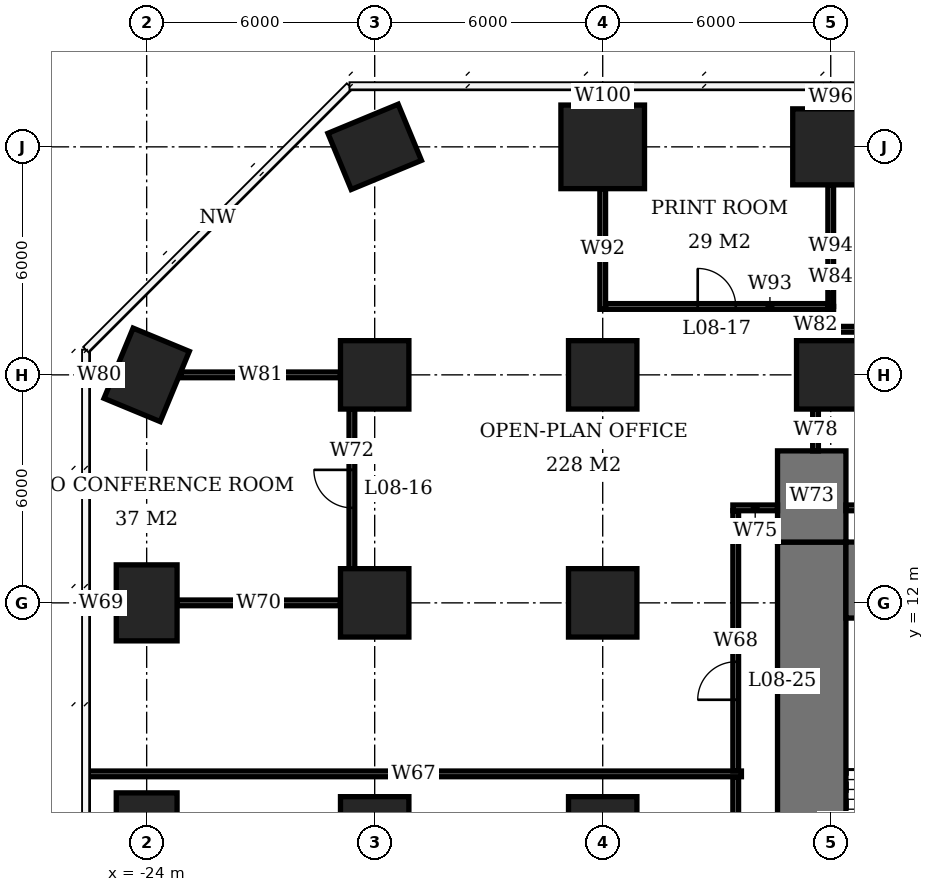
"""IFC4 building model, lengths in metres.
Left out: names, types, materials, properties, quantities, classifications, styles, units other than length and angle.
Written with IfcOpenShell. Run it as: python <this file> out.ifc"""

import sys

from ifc_helpers import new_model, si_unit, direction, frame, frame_2d, origin, origin_2d, place, context, subcontext, project, spatial, rectangle, extrude, element, fill, save


model = new_model("IFC4")
c1 = context("Model", 3, precision=1e-05, world=origin(), true_north=direction((0.0, 1.0)))
c2 = subcontext(c1, "Body", "Model", "MODEL_VIEW")
j1 = project(units=[si_unit("LENGTHUNIT", "METRE"), si_unit("PLANEANGLEUNIT", "RADIAN")], contexts=[c1])
p1 = place(None, origin())
s1 = spatial("IfcSite", under=j1, at=p1, CompositionType="ELEMENT")
p2 = place(p1, origin())
s2 = spatial("IfcBuilding", under=s1, at=p2, CompositionType="ELEMENT")
p3 = place(p2, frame((0.0, 0.0, 37.7)))
s3 = spatial("IfcBuildingStorey", under=s2, at=p3, CompositionType="ELEMENT", Elevation=37.7)
for number, where, z_axis, x_axis in (
    (1, (-24.0, 6.0, 0.0), (0.0, 0.0, 1.0), (0.0, 1.0, 0.0)),
    (2, (-24.0, 12.0, 0.0), (0.0, 0.0, 1.0), (0.0, 1.0, 0.0)),
    (3, (-24.0, 18.0, 0.0), (0.0, 0.0, 1.0), (0.383, 0.924, 0.0)),
):
    element("IfcColumn", number, at=place(p3, frame(where, z_axis=z_axis, x_axis=x_axis)), inside=s3, PredefinedType="COLUMN", context=c2, shape_type="SweptSolid", body=[
        extrude(rectangle(XDim=2.0, YDim=1.6, at=origin_2d()), origin(), (0.0, 0.0, 1.0), 3.9),
    ])
for number, where, z_axis, x_axis in (
    (4, (-18.0, 6.0, 0.0), (0.0, 0.0, 1.0), (1.0, 0.0, 0.0)),
    (5, (-18.0, 12.0, 0.0), (0.0, 0.0, 1.0), (1.0, 0.0, 0.0)),
    (6, (-18.0, 18.0, 0.0), (0.0, 0.0, 1.0), (1.0, 0.0, 0.0)),
):
    element("IfcColumn", number, at=place(p3, frame(where, z_axis=z_axis, x_axis=x_axis)), inside=s3, PredefinedType="COLUMN", context=c2, shape_type="SweptSolid", body=[
        extrude(rectangle(XDim=1.8, YDim=1.8, at=origin_2d()), origin(), (0.0, 0.0, 1.0), 3.9),
    ])
p4 = place(p3, frame((-18.0, 24.0, 0.0), z_axis=(0.0, 0.0, 1.0), x_axis=(0.923879532511, 0.382683432365, 0.0)))
e7 = element("IfcColumn", 7, at=p4, inside=s3, PredefinedType="COLUMN", context=c2, shape_type="SweptSolid", body=[
    extrude(rectangle(XDim=2.0, YDim=1.6, at=origin_2d()), origin(), (0.0, 0.0, 1.0), 3.9),
])
for number, where, z_axis, x_axis in (
    (8, (-12.0, 6.0, 0.0), (0.0, 0.0, 1.0), (1.0, 0.0, 0.0)),
    (9, (-12.0, 12.0, 0.0), (0.0, 0.0, 1.0), (1.0, 0.0, 0.0)),
    (10, (-12.0, 18.0, 0.0), (0.0, 0.0, 1.0), (1.0, 0.0, 0.0)),
):
    element("IfcColumn", number, at=place(p3, frame(where, z_axis=z_axis, x_axis=x_axis)), inside=s3, PredefinedType="COLUMN", context=c2, shape_type="SweptSolid", body=[
        extrude(rectangle(XDim=1.8, YDim=1.8, at=origin_2d()), origin(), (0.0, 0.0, 1.0), 3.9),
    ])
p5 = place(p3, frame((-12.0, 24.0, 0.0), z_axis=(0.0, 0.0, 1.0), x_axis=(1.0, 0.0, 0.0)))
e11 = element("IfcColumn", 11, at=p5, inside=s3, PredefinedType="COLUMN", context=c2, shape_type="SweptSolid", body=[
    extrude(rectangle(XDim=2.2, YDim=2.2, at=origin_2d()), origin(), (0.0, 0.0, 1.0), 3.9),
])
p6 = place(p3, frame((-6.0, 18.0, 0.0), z_axis=(0.0, 0.0, 1.0), x_axis=(1.0, 0.0, 0.0)))
e12 = element("IfcColumn", 12, at=p6, inside=s3, PredefinedType="COLUMN", context=c2, shape_type="SweptSolid", body=[
    extrude(rectangle(XDim=1.8, YDim=1.8, at=origin_2d()), origin(), (0.0, 0.0, 1.0), 3.9),
])
p7 = place(p3, frame((-6.0, 24.0, 0.0), z_axis=(0.0, 0.0, 1.0), x_axis=(1.0, 0.0, 0.0)))
e13 = element("IfcColumn", 13, at=p7, inside=s3, PredefinedType="COLUMN", context=c2, shape_type="SweptSolid", body=[
    extrude(rectangle(XDim=2.0, YDim=2.0, at=origin_2d()), origin(), (0.0, 0.0, 1.0), 3.9),
])
p8 = place(p3, frame((-5.6, 12.6, 0.0), z_axis=(0.0, 0.0, 1.0), x_axis=(1.0, 0.0, 0.0)))
e14 = element("IfcWall", 14, at=p8, inside=s3, PredefinedType="SHEAR", context=c2, shape_type="SweptSolid", body=[
    extrude(rectangle(XDim=23.2, YDim=2.0, at=frame_2d((11.6, 0.0))), origin(), (0.0, 0.0, 1.0), 3.9),
])
p9 = place(p3, frame((-6.5, -7.6, 0.0), z_axis=(0.0, 0.0, 1.0), x_axis=(0.0, 1.0, 0.0)))
e15 = element("IfcWall", 15, at=p9, inside=s3, PredefinedType="SHEAR", context=c2, shape_type="SweptSolid", body=[
    extrude(rectangle(XDim=21.2, YDim=1.8, at=frame_2d((10.6, 0.0))), origin(), (0.0, 0.0, 1.0), 3.9),
])
p10 = place(p9, frame((7.8, 0.0, 0.0)))
e16 = element("IfcOpeningElement", 16, at=p10, cuts=e15, PredefinedType="OPENING", context=c2, shape_type="SweptSolid", body=[
    extrude(rectangle(XDim=1.8, YDim=2.4, at=frame_2d((0.9, 1.2))), frame((0.0, 0.91, 0.0), z_axis=(0.0, -1.0, 0.0), x_axis=(1.0, 0.0, 0.0)), (0.0, 0.0, 1.0), 1.82),
])
p11 = place(p3, frame((-6.5, 13.6, 0.0), z_axis=(0.0, 0.0, 1.0), x_axis=(0.0, 1.0, 0.0)))
e17 = element("IfcWall", 17, at=p11, inside=s3, PredefinedType="SHEAR", context=c2, shape_type="SweptSolid", body=[
    extrude(rectangle(XDim=2.4, YDim=1.8, at=frame_2d((1.2, 0.0))), origin(), (0.0, 0.0, 1.0), 3.9),
])
p12 = place(p3, frame((-25.6, 12.0, 0.0), z_axis=(0.0, 0.0, 1.0), x_axis=(1.0, 0.0, 0.0)))
e18 = element("IfcWall", 18, at=p12, inside=s3, PredefinedType="PARTITIONING", context=c2, shape_type="SweptSolid", body=[
    extrude(rectangle(XDim=0.8, YDim=0.15, at=frame_2d((0.4, 0.0))), origin(), (0.0, 0.0, 1.0), 3.65),
])
p13 = place(p3, frame((-23.2, 12.0, 0.0), z_axis=(0.0, 0.0, 1.0), x_axis=(1.0, 0.0, 0.0)))
e19 = element("IfcWall", 19, at=p13, inside=s3, PredefinedType="PARTITIONING", context=c2, shape_type="SweptSolid", body=[
    extrude(rectangle(XDim=4.3, YDim=0.15, at=frame_2d((2.15, 0.0))), origin(), (0.0, 0.0, 1.0), 3.65),
])
p14 = place(p3, frame((-25.6, 18.0, 0.0), z_axis=(0.0, 0.0, 1.0), x_axis=(1.0, 0.0, 0.0)))
e20 = element("IfcWall", 20, at=p14, inside=s3, PredefinedType="PARTITIONING", context=c2, shape_type="SweptSolid", body=[
    extrude(rectangle(XDim=0.703, YDim=0.15, at=frame_2d((0.352, 0.0))), origin(), (0.0, 0.0, 1.0), 3.65),
])
p15 = place(p3, frame((-23.103, 18.0, 0.0), z_axis=(0.0, 0.0, 1.0), x_axis=(1.0, 0.0, 0.0)))
e21 = element("IfcWall", 21, at=p15, inside=s3, PredefinedType="PARTITIONING", context=c2, shape_type="SweptSolid", body=[
    extrude(rectangle(XDim=4.203, YDim=0.15, at=frame_2d((2.102, 0.0))), origin(), (0.0, 0.0, 1.0), 3.65),
])
p16 = place(p3, frame((-5.925, 19.2, 0.0), z_axis=(0.0, 0.0, 1.0), x_axis=(1.0, 0.0, 0.0)))
e22 = element("IfcWall", 22, at=p16, inside=s3, PredefinedType="PARTITIONING", context=c2, shape_type="SweptSolid", body=[
    extrude(rectangle(XDim=5.85, YDim=0.15, at=frame_2d((2.925, 0.0))), origin(), (0.0, 0.0, 1.0), 3.65),
])
p17 = place(p16, frame((2.425, 0.0, 0.0)))
e23 = element("IfcOpeningElement", 23, at=p17, cuts=e22, PredefinedType="OPENING", context=c2, shape_type="SweptSolid", body=[
    extrude(rectangle(XDim=1.0, YDim=2.1, at=frame_2d((0.5, 1.05))), frame((0.0, 0.085, 0.0), z_axis=(0.0, -1.0, 0.0), x_axis=(1.0, 0.0, 0.0)), (0.0, 0.0, 1.0), 0.17),
])
p18 = place(p3, frame((-11.925, 19.8, 0.0), z_axis=(0.0, 0.0, 1.0), x_axis=(1.0, 0.0, 0.0)))
e24 = element("IfcWall", 24, at=p18, inside=s3, PredefinedType="PARTITIONING", context=c2, shape_type="SweptSolid", body=[
    extrude(rectangle(XDim=5.85, YDim=0.15, at=frame_2d((2.925, 0.0))), origin(), (0.0, 0.0, 1.0), 3.65),
])
p19 = place(p18, frame((2.425, 0.0, 0.0)))
e25 = element("IfcOpeningElement", 25, at=p19, cuts=e24, PredefinedType="OPENING", context=c2, shape_type="SweptSolid", body=[
    extrude(rectangle(XDim=1.0, YDim=2.1, at=frame_2d((0.5, 1.05))), frame((0.0, 0.085, 0.0), z_axis=(0.0, -1.0, 0.0), x_axis=(1.0, 0.0, 0.0)), (0.0, 0.0, 1.0), 0.17),
])
p20 = place(p3, frame((-18.6, 12.9, 0.0), z_axis=(0.0, 0.0, 1.0), x_axis=(0.0, 1.0, 0.0)))
e26 = element("IfcWall", 26, at=p20, inside=s3, PredefinedType="PARTITIONING", context=c2, shape_type="SweptSolid", body=[
    extrude(rectangle(XDim=4.2, YDim=0.15, at=frame_2d((2.1, 0.0))), origin(), (0.0, 0.0, 1.0), 3.65),
])
p21 = place(p20, frame((1.6, 0.0, 0.0)))
e27 = element("IfcOpeningElement", 27, at=p21, cuts=e26, PredefinedType="OPENING", context=c2, shape_type="SweptSolid", body=[
    extrude(rectangle(XDim=1.0, YDim=2.1, at=frame_2d((0.5, 1.05))), frame((0.0, 0.085, 0.0), z_axis=(0.0, -1.0, 0.0), x_axis=(1.0, 0.0, 0.0)), (0.0, 0.0, 1.0), 0.17),
])
p22 = place(p3, frame((-12.0, 19.725, 0.0), z_axis=(0.0, 0.0, 1.0), x_axis=(0.0, 1.0, 0.0)))
e28 = element("IfcWall", 28, at=p22, inside=s3, PredefinedType="PARTITIONING", context=c2, shape_type="SweptSolid", body=[
    extrude(rectangle(XDim=3.175, YDim=0.15, at=frame_2d((1.587, 0.0))), origin(), (0.0, 0.0, 1.0), 3.65),
])
p23 = place(p3, frame((-12.0, 25.1, 0.0), z_axis=(0.0, 0.0, 1.0), x_axis=(0.0, 1.0, 0.0)))
e29 = element("IfcWall", 29, at=p23, inside=s3, PredefinedType="PARTITIONING", context=c2, shape_type="SweptSolid", body=[
    extrude(rectangle(XDim=0.5, YDim=0.15, at=frame_2d((0.25, 0.0))), origin(), (0.0, 0.0, 1.0), 3.65),
])
p24 = place(p3, frame((-6.0, 19.125, 0.0), z_axis=(0.0, 0.0, 1.0), x_axis=(0.0, 1.0, 0.0)))
e30 = element("IfcWall", 30, at=p24, inside=s3, PredefinedType="PARTITIONING", context=c2, shape_type="SweptSolid", body=[
    extrude(rectangle(XDim=0.675, YDim=0.15, at=frame_2d((0.337, 0.0))), origin(), (0.0, 0.0, 1.0), 3.65),
])
p25 = place(p3, frame((-6.0, 19.8, 0.0), z_axis=(0.0, 0.0, 1.0), x_axis=(0.0, 1.0, 0.0)))
e31 = element("IfcWall", 31, at=p25, inside=s3, PredefinedType="PARTITIONING", context=c2, shape_type="SweptSolid", body=[
    extrude(rectangle(XDim=3.2, YDim=0.15, at=frame_2d((1.6, 0.0))), origin(), (0.0, 0.0, 1.0), 3.65),
])
p26 = place(p3, frame((-6.0, 25.0, 0.0), z_axis=(0.0, 0.0, 1.0), x_axis=(0.0, 1.0, 0.0)))
e32 = element("IfcWall", 32, at=p26, inside=s3, PredefinedType="PARTITIONING", context=c2, shape_type="SweptSolid", body=[
    extrude(rectangle(XDim=0.6, YDim=0.15, at=frame_2d((0.3, 0.0))), origin(), (0.0, 0.0, 1.0), 3.65),
])
p27 = place(p3, frame((-25.6, 7.5, 0.0), z_axis=(0.0, 0.0, 1.0), x_axis=(1.0, 0.0, 0.0)))
e33 = element("IfcWall", 33, at=p27, inside=s3, PredefinedType="PARTITIONING", context=c2, shape_type="SweptSolid", body=[
    extrude(rectangle(XDim=17.25, YDim=0.15, at=frame_2d((8.625, 0.0))), origin(), (0.0, 0.0, 1.0), 3.65),
])
p28 = place(p3, frame((-8.5, -1.425, 0.0), z_axis=(0.0, 0.0, 1.0), x_axis=(0.0, 1.0, 0.0)))
e34 = element("IfcWall", 34, at=p28, inside=s3, PredefinedType="PARTITIONING", context=c2, shape_type="SweptSolid", body=[
    extrude(rectangle(XDim=8.85, YDim=0.15, at=frame_2d((4.425, 0.0))), origin(), (0.0, 0.0, 1.0), 3.65),
])
p29 = place(p28, frame((2.575, 0.0, 0.0)))
e35 = element("IfcOpeningElement", 35, at=p29, cuts=e34, PredefinedType="OPENING", context=c2, shape_type="SweptSolid", body=[
    extrude(rectangle(XDim=1.0, YDim=2.1, at=frame_2d((0.5, 1.05))), frame((0.0, 0.085, 0.0), z_axis=(0.0, -1.0, 0.0), x_axis=(1.0, 0.0, 0.0)), (0.0, 0.0, 1.0), 0.17),
])
p30 = place(p3, frame((-8.5, 7.575, 0.0), z_axis=(0.0, 0.0, 1.0), x_axis=(0.0, 1.0, 0.0)))
e36 = element("IfcWall", 36, at=p30, inside=s3, PredefinedType="PARTITIONING", context=c2, shape_type="SweptSolid", body=[
    extrude(rectangle(XDim=6.85, YDim=0.15, at=frame_2d((3.425, 0.0))), origin(), (0.0, 0.0, 1.0), 3.65),
])
p31 = place(p30, frame((1.875, 0.0, 0.0)))
e37 = element("IfcOpeningElement", 37, at=p31, cuts=e36, PredefinedType="OPENING", context=c2, shape_type="SweptSolid", body=[
    extrude(rectangle(XDim=1.0, YDim=2.1, at=frame_2d((0.5, 1.05))), frame((0.0, 0.085, 0.0), z_axis=(0.0, -1.0, 0.0), x_axis=(1.0, 0.0, 0.0)), (0.0, 0.0, 1.0), 0.17),
])
p32 = place(p3, frame((-8.575, 14.5, 0.0), z_axis=(0.0, 0.0, 1.0), x_axis=(1.0, 0.0, 0.0)))
e38 = element("IfcWall", 38, at=p32, inside=s3, PredefinedType="PARTITIONING", context=c2, shape_type="SweptSolid", body=[
    extrude(rectangle(XDim=1.175, YDim=0.15, at=frame_2d((0.587, 0.0))), origin(), (0.0, 0.0, 1.0), 3.65),
])
p33 = place(p3, frame((-6.4, 16.0, 0.0), z_axis=(0.0, 0.0, 1.0), x_axis=(0.0, 1.0, 0.0)))
e39 = element("IfcWall", 39, at=p33, inside=s3, PredefinedType="PARTITIONING", context=c2, shape_type="SweptSolid", body=[
    extrude(rectangle(XDim=1.1, YDim=0.15, at=frame_2d((0.55, 0.0))), origin(), (0.0, 0.0, 1.0), 3.65),
])
p34 = place(p3, frame((-6.4, 18.9, 0.0), z_axis=(0.0, 0.0, 1.0), x_axis=(0.0, 1.0, 0.0)))
e40 = element("IfcWall", 40, at=p34, inside=s3, PredefinedType="PARTITIONING", context=c2, shape_type="SweptSolid", body=[
    extrude(rectangle(XDim=0.825, YDim=0.15, at=frame_2d((0.413, 0.0))), origin(), (0.0, 0.0, 1.0), 3.65),
])
p35 = place(p3, frame((-5.6, 14.5, 0.0), z_axis=(0.0, 0.0, 1.0), x_axis=(1.0, 0.0, 0.0)))
e41 = element("IfcWall", 41, at=p35, inside=s3, PredefinedType="PARTITIONING", context=c2, shape_type="SweptSolid", body=[
    extrude(rectangle(XDim=23.2, YDim=0.15, at=frame_2d((11.6, 0.0))), origin(), (0.0, 0.0, 1.0), 3.65),
])
p36 = place(p35, frame((14.58, 0.0, 0.0)))
e42 = element("IfcOpeningElement", 42, at=p36, cuts=e41, PredefinedType="OPENING", context=c2, shape_type="SweptSolid", body=[
    extrude(rectangle(XDim=1.0, YDim=2.1, at=frame_2d((0.5, 1.05))), frame((0.0, 0.085, 0.0), z_axis=(0.0, -1.0, 0.0), x_axis=(1.0, 0.0, 0.0)), (0.0, 0.0, 1.0), 0.17),
])
p37 = place(p21, origin())
e43 = element("IfcDoor", 43, at=p37, inside=s3, OperationType="SINGLE_SWING_RIGHT", PredefinedType="DOOR", context=c2, shape_type="SweptSolid", body=[
    extrude(rectangle(XDim=1.0, YDim=2.1, at=frame_2d((0.5, 1.05))), frame((0.0, 0.025, 0.0), z_axis=(0.0, -1.0, 0.0), x_axis=(1.0, 0.0, 0.0)), (0.0, 0.0, 1.0), 0.05),
])
fill(e27, e43)
p38 = place(p19, origin())
e44 = element("IfcDoor", 44, at=p38, inside=s3, OperationType="SINGLE_SWING_LEFT", PredefinedType="DOOR", context=c2, shape_type="SweptSolid", body=[
    extrude(rectangle(XDim=1.0, YDim=2.1, at=frame_2d((0.5, 1.05))), frame((0.0, 0.025, 0.0), z_axis=(0.0, -1.0, 0.0), x_axis=(1.0, 0.0, 0.0)), (0.0, 0.0, 1.0), 0.05),
])
fill(e25, e44)
p39 = place(p31, origin())
e45 = element("IfcDoor", 45, at=p39, inside=s3, OperationType="SINGLE_SWING_LEFT", PredefinedType="DOOR", context=c2, shape_type="SweptSolid", body=[
    extrude(rectangle(XDim=1.0, YDim=2.1, at=frame_2d((0.5, 1.05))), frame((0.0, 0.025, 0.0), z_axis=(0.0, -1.0, 0.0), x_axis=(1.0, 0.0, 0.0)), (0.0, 0.0, 1.0), 0.05),
])
fill(e37, e45)
save(model, sys.argv[1])
